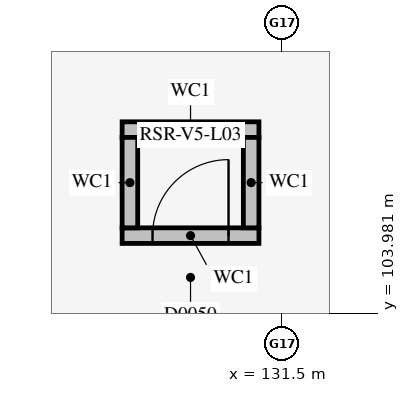
"""IFC4 building model, lengths in metres.
Left out: names, types, materials, properties, quantities, classifications, styles, units other than length and angle.
Written with IfcOpenShell. Run it as: python <this file> out.ifc"""

import sys

from ifc_helpers import new_model, si_unit, direction, frame, frame_2d, origin, place, context, subcontext, project, spatial, rectangle, extrude, element, fill, save


model = new_model("IFC4")
c1 = context("Model", 3, precision=1e-05, world=origin(), true_north=direction((0.0, 1.0)))
c2 = subcontext(c1, "Body", "Model", "MODEL_VIEW")
j1 = project(units=[si_unit("LENGTHUNIT", "METRE"), si_unit("PLANEANGLEUNIT", "RADIAN")], contexts=[c1])
p1 = place(None, origin())
s1 = spatial("IfcSite", under=j1, at=p1, CompositionType="ELEMENT")
p2 = place(p1, origin())
s2 = spatial("IfcBuilding", under=s1, at=p2, CompositionType="ELEMENT")
p3 = place(p2, frame((0.0, 0.0, 14.8)))
s3 = spatial("IfcBuildingStorey", under=s2, at=p3, CompositionType="ELEMENT", Elevation=14.8)
p4 = place(p3, frame((129.4, 105.002, 0.0), z_axis=(0.0, 0.0, 1.0), x_axis=(1.0, 0.0, 0.0)))
e1 = element("IfcWall", 1, at=p4, inside=s3, PredefinedType="SOLIDWALL", context=c2, shape_type="SweptSolid", body=[
    extrude(rectangle(XDim=1.8, YDim=0.205, at=frame_2d((0.9, 0.0))), origin(), (0.0, 0.0, 1.0), 3.805),
])
p5 = place(p4, frame((0.4, 0.0, 0.0)))
e2 = element("IfcOpeningElement", 2, at=p5, cuts=e1, PredefinedType="OPENING", context=c2, shape_type="SweptSolid", body=[
    extrude(rectangle(XDim=1.0, YDim=2.2, at=frame_2d((0.5, 1.1))), frame((0.0, 0.115, 0.0), z_axis=(0.0, -1.0, 0.0), x_axis=(1.0, 0.0, 0.0)), (0.0, 0.0, 1.0), 0.229),
])
p6 = place(p3, frame((129.4, 106.397, 0.0), z_axis=(0.0, 0.0, 1.0), x_axis=(1.0, 0.0, 0.0)))
e3 = element("IfcWall", 3, at=p6, inside=s3, PredefinedType="SOLIDWALL", context=c2, shape_type="SweptSolid", body=[
    extrude(rectangle(XDim=1.8, YDim=0.205, at=frame_2d((0.9, 0.0))), origin(), (0.0, 0.0, 1.0), 3.805),
])
p7 = place(p3, frame((131.097, 105.105, 0.0), z_axis=(0.0, 0.0, 1.0), x_axis=(0.0, 1.0, 0.0)))
e4 = element("IfcWall", 4, at=p7, inside=s3, PredefinedType="SOLIDWALL", context=c2, shape_type="SweptSolid", body=[
    extrude(rectangle(XDim=1.19, YDim=0.205, at=frame_2d((0.595, 0.0))), origin(), (0.0, 0.0, 1.0), 3.805),
])
p8 = place(p3, frame((129.502, 105.105, 0.0), z_axis=(0.0, 0.0, 1.0), x_axis=(0.0, 1.0, 0.0)))
e5 = element("IfcWall", 5, at=p8, inside=s3, PredefinedType="SOLIDWALL", context=c2, shape_type="SweptSolid", body=[
    extrude(rectangle(XDim=1.19, YDim=0.205, at=frame_2d((0.595, 0.0))), origin(), (0.0, 0.0, 1.0), 3.38),
])
p9 = place(p5, origin())
e6 = element("IfcDoor", 6, at=p9, inside=s3, OperationType="SINGLE_SWING_RIGHT", PredefinedType="DOOR", context=c2, shape_type="SweptSolid", body=[
    extrude(rectangle(XDim=1.0, YDim=2.2, at=frame_2d((0.5, 1.1))), frame((0.0, 0.025, 0.0), z_axis=(0.0, -1.0, 0.0), x_axis=(1.0, 0.0, 0.0)), (0.0, 0.0, 1.0), 0.05),
])
fill(e2, e6)
save(model, sys.argv[1])
